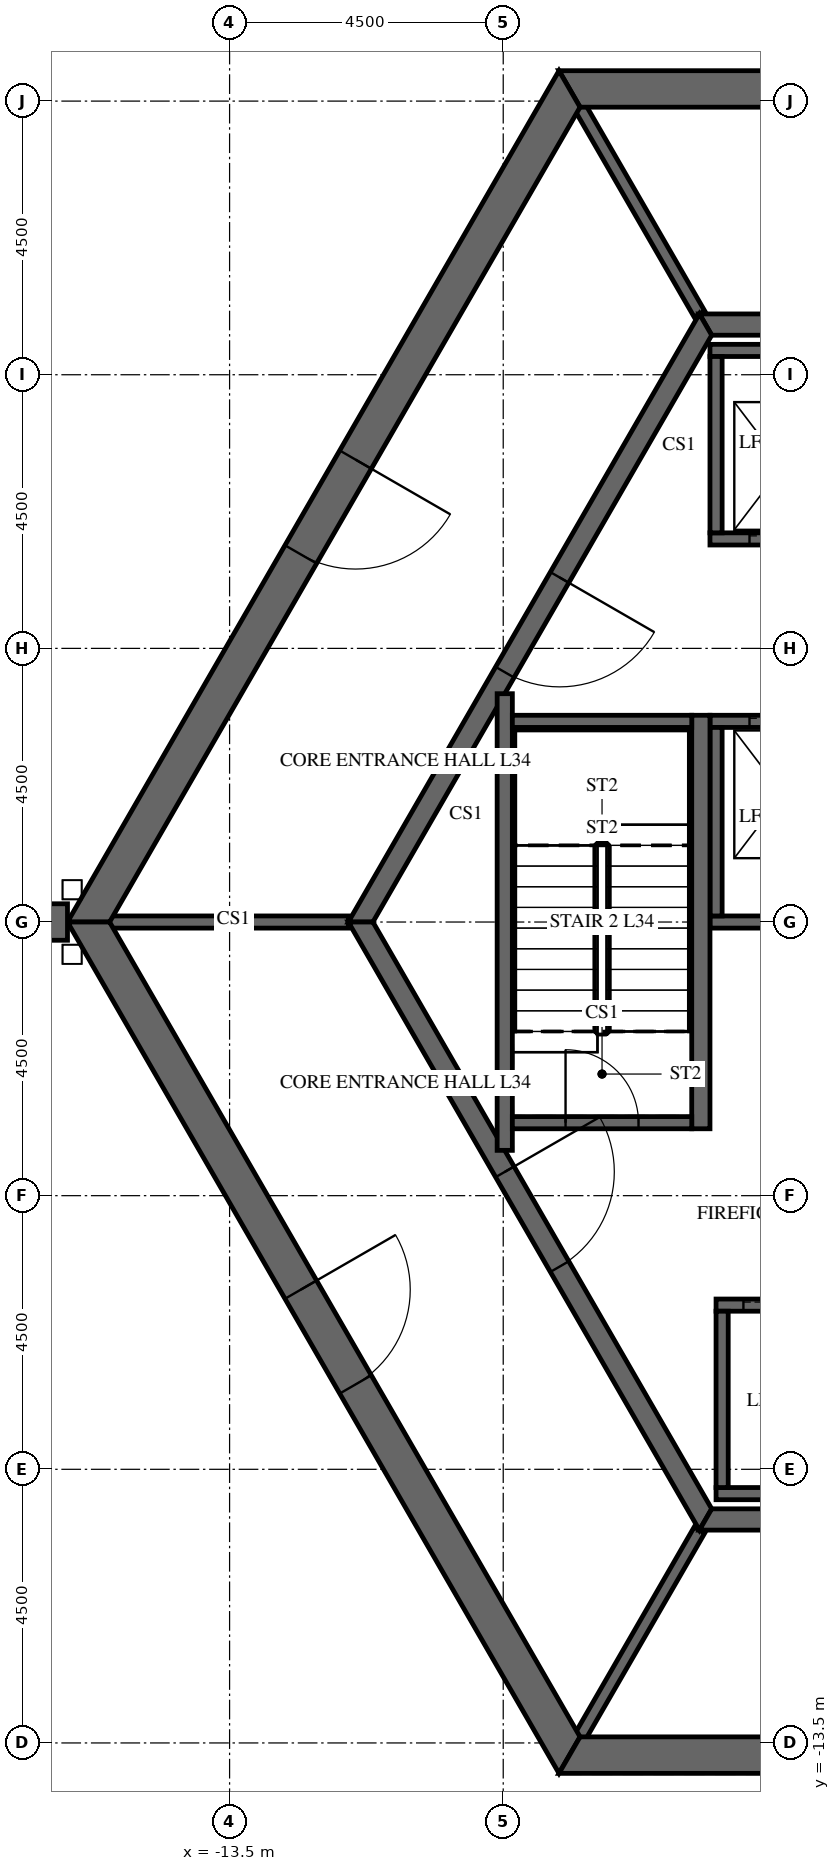
"""IFC4 building model, lengths in metres.
Left out: names, types, materials, properties, quantities, classifications, styles, units other than length and angle.
Written with IfcOpenShell. Run it as: python <this file> out.ifc"""

import sys

from ifc_helpers import new_model, si_unit, direction, frame, frame_2d, origin, place, context, subcontext, project, spatial, polyline, rectangle, outline, extrude, element, fill, save


model = new_model("IFC4")
c1 = context("Model", 3, precision=1e-05, world=origin(), true_north=direction((0.0, 1.0)))
c2 = subcontext(c1, "Body", "Model", "MODEL_VIEW")
j1 = project(units=[si_unit("LENGTHUNIT", "METRE"), si_unit("PLANEANGLEUNIT", "RADIAN")], contexts=[c1])
p1 = place(None, origin())
s1 = spatial("IfcSite", under=j1, at=p1, CompositionType="ELEMENT")
p2 = place(p1, origin())
s2 = spatial("IfcBuilding", under=s1, at=p2, CompositionType="ELEMENT")
p3 = place(p2, frame((0.0, 0.0, 146.7)))
s3 = spatial("IfcBuildingStorey", under=s2, at=p3, CompositionType="ELEMENT", Elevation=146.7)
p4 = place(p3, frame((-7.91, 13.7, -0.3), z_axis=(0.0, 0.0, 1.0), x_axis=(-0.499999880136, -0.866025472988, 0.0)))
e1 = element("IfcWall", 1, at=p4, inside=s3, PredefinedType="SHEAR", context=c2, shape_type="SweptSolid", body=[
    extrude(outline(polyline([(-0.173, -0.3), (15.993, -0.3), (15.646, 0.3), (0.173, 0.3), (-0.173, -0.3)])), origin(), (0.0, 0.0, 1.0), 5.8),
])
p5 = place(p4, frame((7.039, 0.0, 0.3)))
e2 = element("IfcOpeningElement", 2, at=p5, cuts=e1, PredefinedType="OPENING", context=c2, shape_type="SweptSolid", body=[
    extrude(rectangle(XDim=1.8, YDim=2.4, at=frame_2d((0.9, 1.2))), frame((0.0, 0.31, 0.0), z_axis=(0.0, -1.0, 0.0), x_axis=(1.0, 0.0, 0.0)), (0.0, 0.0, 1.0), 0.62),
])
p6 = place(p3, frame((-15.819, 0.0, -0.3), z_axis=(0.0, 0.0, 1.0), x_axis=(0.499999880136, -0.866025472988, 0.0)))
e3 = element("IfcWall", 3, at=p6, inside=s3, PredefinedType="SHEAR", context=c2, shape_type="SweptSolid", body=[
    extrude(outline(polyline([(-0.173, -0.3), (15.993, -0.3), (15.646, 0.3), (0.173, 0.3), (-0.173, -0.3)])), origin(), (0.0, 0.0, 1.0), 5.8),
])
p7 = place(p6, frame((6.981, 0.0, 0.3)))
e4 = element("IfcOpeningElement", 4, at=p7, cuts=e3, PredefinedType="OPENING", context=c2, shape_type="SweptSolid", body=[
    extrude(rectangle(XDim=1.8, YDim=2.4, at=frame_2d((0.9, 1.2))), frame((0.0, 0.31, 0.0), z_axis=(0.0, -1.0, 0.0), x_axis=(1.0, 0.0, 0.0)), (0.0, 0.0, 1.0), 0.62),
])
p8 = place(p3, frame((-7.91, -13.7, -0.3), z_axis=(0.0, 0.0, 1.0), x_axis=(1.0, 0.0, 0.0)))
e5 = element("IfcWall", 5, at=p8, inside=s3, PredefinedType="SHEAR", context=c2, shape_type="SweptSolid", body=[
    extrude(outline(polyline([(-0.173, -0.3), (15.993, -0.3), (15.646, 0.3), (0.173, 0.3), (-0.173, -0.3)])), origin(), (0.0, 0.0, 1.0), 5.8),
])
p9 = place(p8, frame((7.31, 0.0, 0.3)))
e6 = element("IfcOpeningElement", 6, at=p9, cuts=e5, PredefinedType="OPENING", context=c2, shape_type="SweptSolid", body=[
    extrude(rectangle(XDim=1.2, YDim=2.4, at=frame_2d((0.6, 1.2))), frame((0.0, 0.31, 0.0), z_axis=(0.0, -1.0, 0.0), x_axis=(1.0, 0.0, 0.0)), (0.0, 0.0, 1.0), 0.62),
])
p10 = place(p3, frame((7.91, 13.7, -0.3), z_axis=(0.0, 0.0, 1.0), x_axis=(-1.0, 0.0, 0.0)))
e7 = element("IfcWall", 7, at=p10, inside=s3, PredefinedType="SHEAR", context=c2, shape_type="SweptSolid", body=[
    extrude(outline(polyline([(-0.173, -0.3), (15.993, -0.3), (15.646, 0.3), (0.173, 0.3), (-0.173, -0.3)])), origin(), (0.0, 0.0, 1.0), 5.8),
])
p11 = place(p10, frame((7.31, 0.0, 0.3)))
e8 = element("IfcOpeningElement", 8, at=p11, cuts=e7, PredefinedType="OPENING", context=c2, shape_type="SweptSolid", body=[
    extrude(rectangle(XDim=1.2, YDim=2.4, at=frame_2d((0.6, 1.2))), frame((0.0, 0.31, 0.0), z_axis=(0.0, -1.0, 0.0), x_axis=(1.0, 0.0, 0.0)), (0.0, 0.0, 1.0), 0.62),
])
p12 = place(p3, frame((-16.166, 0.0, -0.3), z_axis=(0.0, 0.0, 1.0), x_axis=(-1.0, 0.0, 0.0)))
e9 = element("IfcWall", 9, at=p12, inside=s3, PredefinedType="SHEAR", context=c2, shape_type="SweptSolid", body=[
    extrude(rectangle(XDim=16.509, YDim=0.6, at=frame_2d((8.254, 0.0))), origin(), (0.0, 0.0, 1.0), 5.8),
])
p13 = place(p12, frame((7.354, 0.0, 0.3)))
e10 = element("IfcOpeningElement", 10, at=p13, cuts=e9, PredefinedType="OPENING", context=c2, shape_type="SweptSolid", body=[
    extrude(rectangle(XDim=1.8, YDim=2.4, at=frame_2d((0.9, 1.2))), frame((0.0, 0.31, 0.0), z_axis=(0.0, -1.0, 0.0), x_axis=(1.0, 0.0, 0.0)), (0.0, 0.0, 1.0), 0.62),
])
p14 = place(p3, frame((-5.673, 9.825, -0.3), z_axis=(0.0, 0.0, 1.0), x_axis=(-0.499995046907, -0.866028263435, 0.0)))
e11 = element("IfcWall", 11, at=p14, inside=s3, PredefinedType="SHEAR", context=c2, shape_type="SweptSolid", body=[
    extrude(outline(polyline([(-0.101, -0.175), (11.446, -0.175), (11.244, 0.175), (0.101, 0.175), (-0.101, -0.175)])), origin(), (0.0, 0.0, 1.0), 5.8),
])
p15 = place(p14, frame((4.801, 0.0, 0.3)))
e12 = element("IfcOpeningElement", 12, at=p15, cuts=e11, PredefinedType="OPENING", context=c2, shape_type="SweptSolid", body=[
    extrude(rectangle(XDim=1.8, YDim=2.4, at=frame_2d((0.9, 1.2))), frame((0.0, 0.185, 0.0), z_axis=(0.0, -1.0, 0.0), x_axis=(1.0, 0.0, 0.0)), (0.0, 0.0, 1.0), 0.37),
])
p16 = place(p3, frame((-11.345, 0.0, -0.3), z_axis=(0.0, 0.0, 1.0), x_axis=(0.499995046907, -0.866028263435, 0.0)))
e13 = element("IfcWall", 13, at=p16, inside=s3, PredefinedType="SHEAR", context=c2, shape_type="SweptSolid", body=[
    extrude(outline(polyline([(-0.101, -0.175), (11.446, -0.175), (11.244, 0.175), (0.101, 0.175), (-0.101, -0.175)])), origin(), (0.0, 0.0, 1.0), 5.8),
])
p17 = place(p16, frame((4.744, 0.0, 0.3)))
e14 = element("IfcOpeningElement", 14, at=p17, cuts=e13, PredefinedType="OPENING", context=c2, shape_type="SweptSolid", body=[
    extrude(rectangle(XDim=1.8, YDim=2.4, at=frame_2d((0.9, 1.2))), frame((0.0, 0.185, 0.0), z_axis=(0.0, -1.0, 0.0), x_axis=(1.0, 0.0, 0.0)), (0.0, 0.0, 1.0), 0.37),
])
for number, where, z_axis, x_axis in (
    (15, (-5.673, -9.825, -0.3), (0.0, 0.0, 1.0), (1.0, 0.0, 0.0)),
    (16, (5.673, 9.825, -0.3), (0.0, 0.0, 1.0), (-1.0, 0.0, 0.0)),
):
    element("IfcWall", number, at=place(p3, frame(where, z_axis=z_axis, x_axis=x_axis)), inside=s3, PredefinedType="SHEAR", context=c2, shape_type="SweptSolid", body=[
        extrude(outline(polyline([(-0.101, -0.175), (11.446, -0.175), (11.244, 0.175), (0.101, 0.175), (-0.101, -0.175)])), origin(), (0.0, 0.0, 1.0), 5.8),
    ])
p18 = place(p3, frame((-5.6, 6.3, -0.25), z_axis=(0.0, 0.0, 1.0), x_axis=(1.0, 0.0, 0.0)))
e17 = element("IfcWall", 17, at=p18, inside=s3, PredefinedType="SHEAR", context=c2, shape_type="SweptSolid", body=[
    extrude(rectangle(XDim=11.2, YDim=0.2, at=frame_2d((5.6, 0.0))), origin(), (0.0, 0.0, 1.0), 5.75),
])
p19 = place(p18, frame((0.65, 0.0, 0.25)))
e18 = element("IfcOpeningElement", 18, at=p19, cuts=e17, PredefinedType="OPENING", context=c2, shape_type="SweptSolid", body=[
    extrude(rectangle(XDim=1.1, YDim=2.1, at=frame_2d((0.55, 1.05))), frame((0.0, 0.11, 0.0), z_axis=(0.0, -1.0, 0.0), x_axis=(1.0, 0.0, 0.0)), (0.0, 0.0, 1.0), 0.22),
])
p20 = place(p18, frame((2.85, 0.0, 0.25)))
e19 = element("IfcOpeningElement", 19, at=p20, cuts=e17, PredefinedType="OPENING", context=c2, shape_type="SweptSolid", body=[
    extrude(rectangle(XDim=1.1, YDim=2.1, at=frame_2d((0.55, 1.05))), frame((0.0, 0.11, 0.0), z_axis=(0.0, -1.0, 0.0), x_axis=(1.0, 0.0, 0.0)), (0.0, 0.0, 1.0), 0.22),
])
p21 = place(p18, frame((5.05, 0.0, 0.25)))
e20 = element("IfcOpeningElement", 20, at=p21, cuts=e17, PredefinedType="OPENING", context=c2, shape_type="SweptSolid", body=[
    extrude(rectangle(XDim=1.1, YDim=2.1, at=frame_2d((0.55, 1.05))), frame((0.0, 0.11, 0.0), z_axis=(0.0, -1.0, 0.0), x_axis=(1.0, 0.0, 0.0)), (0.0, 0.0, 1.0), 0.22),
])
p22 = place(p18, frame((7.25, 0.0, 0.25)))
e21 = element("IfcOpeningElement", 21, at=p22, cuts=e17, PredefinedType="OPENING", context=c2, shape_type="SweptSolid", body=[
    extrude(rectangle(XDim=1.1, YDim=2.1, at=frame_2d((0.55, 1.05))), frame((0.0, 0.11, 0.0), z_axis=(0.0, -1.0, 0.0), x_axis=(1.0, 0.0, 0.0)), (0.0, 0.0, 1.0), 0.22),
])
p23 = place(p18, frame((9.45, 0.0, 0.25)))
e22 = element("IfcOpeningElement", 22, at=p23, cuts=e17, PredefinedType="OPENING", context=c2, shape_type="SweptSolid", body=[
    extrude(rectangle(XDim=1.1, YDim=2.1, at=frame_2d((0.55, 1.05))), frame((0.0, 0.11, 0.0), z_axis=(0.0, -1.0, 0.0), x_axis=(1.0, 0.0, 0.0)), (0.0, 0.0, 1.0), 0.22),
])
p24 = place(p3, frame((-5.6, 9.4, -0.25), z_axis=(0.0, 0.0, 1.0), x_axis=(1.0, 0.0, 0.0)))
e23 = element("IfcWall", 23, at=p24, inside=s3, PredefinedType="SHEAR", context=c2, shape_type="SweptSolid", body=[
    extrude(rectangle(XDim=11.2, YDim=0.2, at=frame_2d((5.6, 0.0))), origin(), (0.0, 0.0, 1.0), 5.75),
])
p25 = place(p3, frame((-5.5, 6.4, -0.25), z_axis=(0.0, 0.0, 1.0), x_axis=(0.0, 1.0, 0.0)))
e24 = element("IfcWall", 24, at=p25, inside=s3, PredefinedType="SHEAR", context=c2, shape_type="SweptSolid", body=[
    extrude(rectangle(XDim=2.9, YDim=0.2, at=frame_2d((1.45, 0.0))), origin(), (0.0, 0.0, 1.0), 5.75),
])
p26 = place(p3, frame((-5.6, 3.3, -0.25), z_axis=(0.0, 0.0, 1.0), x_axis=(1.0, 0.0, 0.0)))
e25 = element("IfcWall", 25, at=p26, inside=s3, PredefinedType="SHEAR", context=c2, shape_type="SweptSolid", body=[
    extrude(rectangle(XDim=11.2, YDim=0.2, at=frame_2d((5.6, 0.0))), origin(), (0.0, 0.0, 1.0), 5.75),
])
p27 = place(p26, frame((0.65, 0.0, 0.25)))
e26 = element("IfcOpeningElement", 26, at=p27, cuts=e25, PredefinedType="OPENING", context=c2, shape_type="SweptSolid", body=[
    extrude(rectangle(XDim=1.1, YDim=2.1, at=frame_2d((0.55, 1.05))), frame((0.0, 0.11, 0.0), z_axis=(0.0, -1.0, 0.0), x_axis=(1.0, 0.0, 0.0)), (0.0, 0.0, 1.0), 0.22),
])
p28 = place(p26, frame((2.85, 0.0, 0.25)))
e27 = element("IfcOpeningElement", 27, at=p28, cuts=e25, PredefinedType="OPENING", context=c2, shape_type="SweptSolid", body=[
    extrude(rectangle(XDim=1.1, YDim=2.1, at=frame_2d((0.55, 1.05))), frame((0.0, 0.11, 0.0), z_axis=(0.0, -1.0, 0.0), x_axis=(1.0, 0.0, 0.0)), (0.0, 0.0, 1.0), 0.22),
])
p29 = place(p26, frame((5.05, 0.0, 0.25)))
e28 = element("IfcOpeningElement", 28, at=p29, cuts=e25, PredefinedType="OPENING", context=c2, shape_type="SweptSolid", body=[
    extrude(rectangle(XDim=1.1, YDim=2.1, at=frame_2d((0.55, 1.05))), frame((0.0, 0.11, 0.0), z_axis=(0.0, -1.0, 0.0), x_axis=(1.0, 0.0, 0.0)), (0.0, 0.0, 1.0), 0.22),
])
p30 = place(p26, frame((7.25, 0.0, 0.25)))
e29 = element("IfcOpeningElement", 29, at=p30, cuts=e25, PredefinedType="OPENING", context=c2, shape_type="SweptSolid", body=[
    extrude(rectangle(XDim=1.1, YDim=2.1, at=frame_2d((0.55, 1.05))), frame((0.0, 0.11, 0.0), z_axis=(0.0, -1.0, 0.0), x_axis=(1.0, 0.0, 0.0)), (0.0, 0.0, 1.0), 0.22),
])
p31 = place(p26, frame((9.45, 0.0, 0.25)))
e30 = element("IfcOpeningElement", 30, at=p31, cuts=e25, PredefinedType="OPENING", context=c2, shape_type="SweptSolid", body=[
    extrude(rectangle(XDim=1.1, YDim=2.1, at=frame_2d((0.55, 1.05))), frame((0.0, 0.11, 0.0), z_axis=(0.0, -1.0, 0.0), x_axis=(1.0, 0.0, 0.0)), (0.0, 0.0, 1.0), 0.22),
])
p32 = place(p3, frame((-5.6, 0.0, -0.25), z_axis=(0.0, 0.0, 1.0), x_axis=(1.0, 0.0, 0.0)))
e31 = element("IfcWall", 31, at=p32, inside=s3, PredefinedType="SHEAR", context=c2, shape_type="SweptSolid", body=[
    extrude(rectangle(XDim=11.2, YDim=0.2, at=frame_2d((5.6, 0.0))), origin(), (0.0, 0.0, 1.0), 5.75),
])
p33 = place(p3, frame((-5.5, 0.1, -0.25), z_axis=(0.0, 0.0, 1.0), x_axis=(0.0, 1.0, 0.0)))
e32 = element("IfcWall", 32, at=p33, inside=s3, PredefinedType="SHEAR", context=c2, shape_type="SweptSolid", body=[
    extrude(rectangle(XDim=3.1, YDim=0.2, at=frame_2d((1.55, 0.0))), origin(), (0.0, 0.0, 1.0), 5.75),
])
p34 = place(p3, frame((-5.5, -6.3, -0.25), z_axis=(0.0, 0.0, 1.0), x_axis=(1.0, 0.0, 0.0)))
e33 = element("IfcWall", 33, at=p34, inside=s3, PredefinedType="SHEAR", context=c2, shape_type="SweptSolid", body=[
    extrude(rectangle(XDim=9.2, YDim=0.2, at=frame_2d((4.6, 0.0))), origin(), (0.0, 0.0, 1.0), 5.75),
])
p35 = place(p34, frame((0.45, 0.0, 0.25)))
e34 = element("IfcOpeningElement", 34, at=p35, cuts=e33, PredefinedType="OPENING", context=c2, shape_type="SweptSolid", body=[
    extrude(rectangle(XDim=1.1, YDim=2.1, at=frame_2d((0.55, 1.05))), frame((0.0, 0.11, 0.0), z_axis=(0.0, -1.0, 0.0), x_axis=(1.0, 0.0, 0.0)), (0.0, 0.0, 1.0), 0.22),
])
p36 = place(p34, frame((2.25, 0.0, 0.25)))
e35 = element("IfcOpeningElement", 35, at=p36, cuts=e33, PredefinedType="OPENING", context=c2, shape_type="SweptSolid", body=[
    extrude(rectangle(XDim=1.1, YDim=2.1, at=frame_2d((0.55, 1.05))), frame((0.0, 0.11, 0.0), z_axis=(0.0, -1.0, 0.0), x_axis=(1.0, 0.0, 0.0)), (0.0, 0.0, 1.0), 0.22),
])
p37 = place(p34, frame((4.05, 0.0, 0.25)))
e36 = element("IfcOpeningElement", 36, at=p37, cuts=e33, PredefinedType="OPENING", context=c2, shape_type="SweptSolid", body=[
    extrude(rectangle(XDim=1.1, YDim=2.1, at=frame_2d((0.55, 1.05))), frame((0.0, 0.11, 0.0), z_axis=(0.0, -1.0, 0.0), x_axis=(1.0, 0.0, 0.0)), (0.0, 0.0, 1.0), 0.22),
])
p38 = place(p34, frame((5.85, 0.0, 0.25)))
e37 = element("IfcOpeningElement", 37, at=p38, cuts=e33, PredefinedType="OPENING", context=c2, shape_type="SweptSolid", body=[
    extrude(rectangle(XDim=1.1, YDim=2.1, at=frame_2d((0.55, 1.05))), frame((0.0, 0.11, 0.0), z_axis=(0.0, -1.0, 0.0), x_axis=(1.0, 0.0, 0.0)), (0.0, 0.0, 1.0), 0.22),
])
p39 = place(p34, frame((7.65, 0.0, 0.25)))
e38 = element("IfcOpeningElement", 38, at=p39, cuts=e33, PredefinedType="OPENING", context=c2, shape_type="SweptSolid", body=[
    extrude(rectangle(XDim=1.1, YDim=2.1, at=frame_2d((0.55, 1.05))), frame((0.0, 0.11, 0.0), z_axis=(0.0, -1.0, 0.0), x_axis=(1.0, 0.0, 0.0)), (0.0, 0.0, 1.0), 0.22),
])
p40 = place(p3, frame((-5.5, -9.4, -0.25), z_axis=(0.0, 0.0, 1.0), x_axis=(1.0, 0.0, 0.0)))
e39 = element("IfcWall", 39, at=p40, inside=s3, PredefinedType="SHEAR", context=c2, shape_type="SweptSolid", body=[
    extrude(rectangle(XDim=9.2, YDim=0.2, at=frame_2d((4.6, 0.0))), origin(), (0.0, 0.0, 1.0), 5.75),
])
p41 = place(p3, frame((-5.4, -9.3, -0.25), z_axis=(0.0, 0.0, 1.0), x_axis=(0.0, 1.0, 0.0)))
e40 = element("IfcWall", 40, at=p41, inside=s3, PredefinedType="SHEAR", context=c2, shape_type="SweptSolid", body=[
    extrude(rectangle(XDim=2.9, YDim=0.2, at=frame_2d((1.45, 0.0))), origin(), (0.0, 0.0, 1.0), 5.75),
])
p42 = place(p3, frame((-5.773, 10.0, -0.3), z_axis=(0.0, 0.0, 1.0), x_axis=(-0.500038251005, 0.86600331843, 0.0)))
e41 = element("IfcWall", 41, at=p42, inside=s3, PredefinedType="SHEAR", context=c2, shape_type="SweptSolid", body=[
    extrude(rectangle(XDim=3.926, YDim=0.2, at=frame_2d((1.963, 0.0))), origin(), (0.0, 0.0, 1.0), 5.8),
])
p43 = place(p3, frame((-11.547, 0.0, -0.3), z_axis=(0.0, 0.0, 1.0), x_axis=(-1.0, 0.0, 0.0)))
e42 = element("IfcWall", 42, at=p43, inside=s3, PredefinedType="SHEAR", context=c2, shape_type="SweptSolid", body=[
    extrude(rectangle(XDim=3.926, YDim=0.2, at=frame_2d((1.963, 0.0))), origin(), (0.0, 0.0, 1.0), 5.8),
])
p44 = place(p3, frame((-5.773, -10.0, -0.3), z_axis=(0.0, 0.0, 1.0), x_axis=(-0.500038251005, -0.86600331843, 0.0)))
e43 = element("IfcWall", 43, at=p44, inside=s3, PredefinedType="SHEAR", context=c2, shape_type="SweptSolid", body=[
    extrude(rectangle(XDim=3.926, YDim=0.2, at=frame_2d((1.963, 0.0))), origin(), (0.0, 0.0, 1.0), 5.8),
])
p45 = place(p3, frame((-5.75, -3.4, -0.25), z_axis=(0.0, 0.0, 1.0), x_axis=(0.0, 1.0, 0.0)))
e44 = element("IfcWall", 44, at=p45, inside=s3, PredefinedType="SHEAR", context=c2, shape_type="SweptSolid", body=[
    extrude(rectangle(XDim=6.8, YDim=0.3, at=frame_2d((3.4, 0.0))), origin(), (0.0, 0.0, 1.0), 5.75),
])
p46 = place(p3, frame((-8.975, -3.755, -0.25), z_axis=(0.0, 0.0, 1.0), x_axis=(0.0, 1.0, 0.0)))
e45 = element("IfcWall", 45, at=p46, inside=s3, PredefinedType="SHEAR", context=c2, shape_type="SweptSolid", body=[
    extrude(rectangle(XDim=7.51, YDim=0.25, at=frame_2d((3.755, 0.0))), origin(), (0.0, 0.0, 1.0), 5.75),
])
p47 = place(p3, frame((-8.85, 3.3, -0.25), z_axis=(0.0, 0.0, 1.0), x_axis=(1.0, 0.0, 0.0)))
e46 = element("IfcWall", 46, at=p47, inside=s3, PredefinedType="SHEAR", context=c2, shape_type="SweptSolid", body=[
    extrude(rectangle(XDim=2.95, YDim=0.2, at=frame_2d((1.475, 0.0))), origin(), (0.0, 0.0, 1.0), 5.75),
])
p48 = place(p3, frame((-8.85, -3.3, -0.25), z_axis=(0.0, 0.0, 1.0), x_axis=(1.0, 0.0, 0.0)))
e47 = element("IfcWall", 47, at=p48, inside=s3, PredefinedType="SHEAR", context=c2, shape_type="SweptSolid", body=[
    extrude(rectangle(XDim=2.95, YDim=0.2, at=frame_2d((1.475, 0.0))), origin(), (0.0, 0.0, 1.0), 5.75),
])
p49 = place(p48, frame((0.875, 0.0, 0.25)))
e48 = element("IfcOpeningElement", 48, at=p49, cuts=e47, PredefinedType="OPENING", context=c2, shape_type="SweptSolid", body=[
    extrude(rectangle(XDim=1.2, YDim=2.4, at=frame_2d((0.6, 1.2))), frame((0.0, 0.11, 0.0), z_axis=(0.0, -1.0, 0.0), x_axis=(1.0, 0.0, 0.0)), (0.0, 0.0, 1.0), 0.22),
])
p50 = place(p3, frame((-13.291, 23.02, 0.0), z_axis=(0.0, 0.0, 1.0), x_axis=(-0.499987482804, -0.86603263047, 0.0)))
e49 = element("IfcWall", 49, at=p50, inside=s3, PredefinedType="PARTITIONING", context=c2, shape_type="SweptSolid", body=[
    extrude(rectangle(XDim=26.235, YDim=0.2, at=frame_2d((13.117, 0.0))), origin(), (0.0, 0.0, 1.0), 5.5),
])
p51 = place(p50, frame((12.517, 0.0, 0.0)))
e50 = element("IfcOpeningElement", 50, at=p51, cuts=e49, PredefinedType="OPENING", context=c2, shape_type="SweptSolid", body=[
    extrude(rectangle(XDim=1.2, YDim=2.1, at=frame_2d((0.6, 1.05))), frame((0.0, 0.11, 0.0), z_axis=(0.0, -1.0, 0.0), x_axis=(1.0, 0.0, 0.0)), (0.0, 0.0, 1.0), 0.22),
])
p52 = place(p5, origin())
e51 = element("IfcDoor", 51, at=p52, inside=s3, OperationType="DOUBLE_DOOR_SINGLE_SWING", PredefinedType="DOOR", context=c2, shape_type="SweptSolid", body=[
    extrude(rectangle(XDim=1.8, YDim=2.4, at=frame_2d((0.9, 1.2))), frame((0.0, 0.025, 0.0), z_axis=(0.0, -1.0, 0.0), x_axis=(1.0, 0.0, 0.0)), (0.0, 0.0, 1.0), 0.05),
])
fill(e2, e51)
p53 = place(p7, origin())
e52 = element("IfcDoor", 52, at=p53, inside=s3, OperationType="DOUBLE_DOOR_SINGLE_SWING", PredefinedType="DOOR", context=c2, shape_type="SweptSolid", body=[
    extrude(rectangle(XDim=1.8, YDim=2.4, at=frame_2d((0.9, 1.2))), frame((0.0, 0.025, 0.0), z_axis=(0.0, -1.0, 0.0), x_axis=(1.0, 0.0, 0.0)), (0.0, 0.0, 1.0), 0.05),
])
fill(e4, e52)
p54 = place(p15, origin())
e53 = element("IfcDoor", 53, at=p54, inside=s3, OperationType="DOUBLE_DOOR_SINGLE_SWING", PredefinedType="DOOR", context=c2, shape_type="SweptSolid", body=[
    extrude(rectangle(XDim=1.8, YDim=2.4, at=frame_2d((0.9, 1.2))), frame((0.0, 0.025, 0.0), z_axis=(0.0, -1.0, 0.0), x_axis=(1.0, 0.0, 0.0)), (0.0, 0.0, 1.0), 0.05),
])
fill(e12, e53)
p55 = place(p17, origin())
e54 = element("IfcDoor", 54, at=p55, inside=s3, OperationType="DOUBLE_DOOR_SINGLE_SWING", PredefinedType="DOOR", context=c2, shape_type="SweptSolid", body=[
    extrude(rectangle(XDim=1.8, YDim=2.4, at=frame_2d((0.9, 1.2))), frame((0.0, 0.025, 0.0), z_axis=(0.0, -1.0, 0.0), x_axis=(1.0, 0.0, 0.0)), (0.0, 0.0, 1.0), 0.05),
])
fill(e14, e54)
p56 = place(p49, origin())
e55 = element("IfcDoor", 55, at=p56, inside=s3, OperationType="SINGLE_SWING_LEFT", PredefinedType="DOOR", context=c2, shape_type="SweptSolid", body=[
    extrude(rectangle(XDim=1.2, YDim=2.4, at=frame_2d((0.6, 1.2))), frame((0.0, 0.025, 0.0), z_axis=(0.0, -1.0, 0.0), x_axis=(1.0, 0.0, 0.0)), (0.0, 0.0, 1.0), 0.05),
])
fill(e48, e55)
p57 = place(p19, origin())
e56 = element("IfcDoor", 56, at=p57, inside=s3, OperationType="SLIDING_TO_LEFT", PredefinedType="DOOR", context=c2, shape_type="SweptSolid", body=[
    extrude(rectangle(XDim=1.1, YDim=2.1, at=frame_2d((0.55, 1.05))), frame((0.0, 0.025, 0.0), z_axis=(0.0, -1.0, 0.0), x_axis=(1.0, 0.0, 0.0)), (0.0, 0.0, 1.0), 0.05),
])
fill(e18, e56)
p58 = place(p27, origin())
e57 = element("IfcDoor", 57, at=p58, inside=s3, OperationType="SLIDING_TO_LEFT", PredefinedType="DOOR", context=c2, shape_type="SweptSolid", body=[
    extrude(rectangle(XDim=1.1, YDim=2.1, at=frame_2d((0.55, 1.05))), frame((0.0, 0.025, 0.0), z_axis=(0.0, -1.0, 0.0), x_axis=(1.0, 0.0, 0.0)), (0.0, 0.0, 1.0), 0.05),
])
fill(e26, e57)
p59 = place(p35, origin())
e58 = element("IfcDoor", 58, at=p59, inside=s3, OperationType="SLIDING_TO_LEFT", PredefinedType="DOOR", context=c2, shape_type="SweptSolid", body=[
    extrude(rectangle(XDim=1.1, YDim=2.1, at=frame_2d((0.55, 1.05))), frame((0.0, 0.025, 0.0), z_axis=(0.0, -1.0, 0.0), x_axis=(1.0, 0.0, 0.0)), (0.0, 0.0, 1.0), 0.05),
])
fill(e34, e58)
save(model, sys.argv[1])
